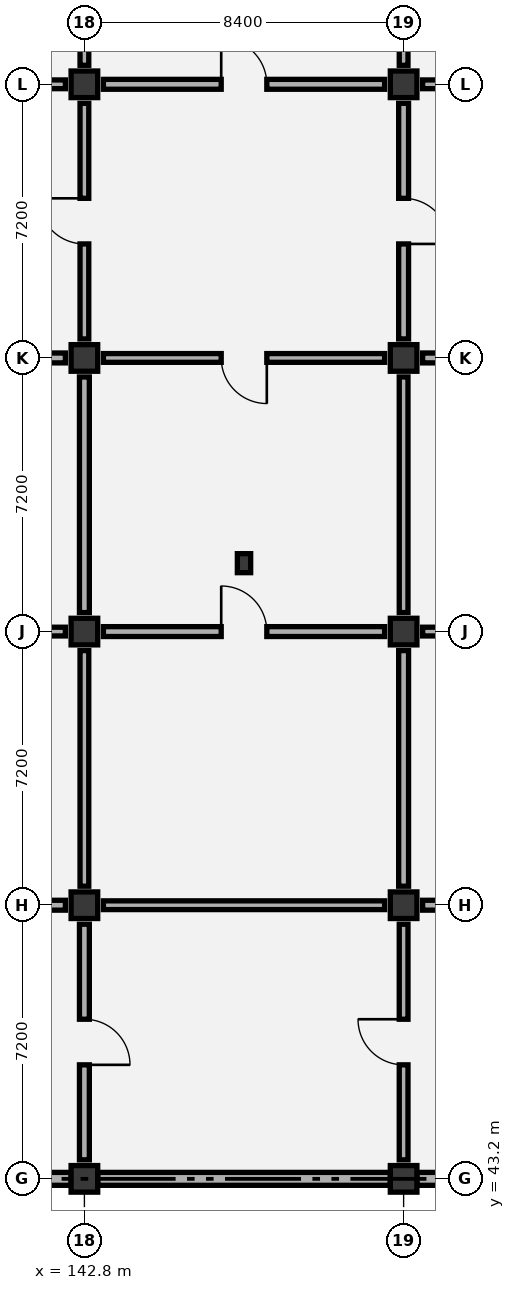
"""IFC4 building model, lengths in metres.
Left out: names, types, materials, properties, quantities, classifications, styles, units other than length and angle.
Written with IfcOpenShell. Run it as: python <this file> out.ifc"""

import sys

from ifc_helpers import new_model, si_unit, direction, frame, frame_2d, origin, origin_2d, place, context, subcontext, project, spatial, rectangle, extrude, element, fill, save


model = new_model("IFC4")
c1 = context("Model", 3, precision=1e-05, world=origin(), true_north=direction((0.0, 1.0)))
c2 = subcontext(c1, "Body", "Model", "MODEL_VIEW")
j1 = project(units=[si_unit("LENGTHUNIT", "METRE"), si_unit("PLANEANGLEUNIT", "RADIAN")], contexts=[c1])
p1 = place(None, origin())
s1 = spatial("IfcSite", under=j1, at=p1, CompositionType="ELEMENT")
p2 = place(p1, origin())
s2 = spatial("IfcBuilding", under=s1, at=p2, CompositionType="ELEMENT")
p3 = place(p2, origin())
s3 = spatial("IfcBuildingStorey", under=s2, at=p3, CompositionType="ELEMENT", Elevation=0.0)
for number, where, z_axis, x_axis in (
    (1, (142.8, 43.2, 0.0), (0.0, 0.0, 1.0), (1.0, 0.0, 0.0)),
    (2, (142.8, 50.4, 0.0), (0.0, 0.0, 1.0), (1.0, 0.0, 0.0)),
    (3, (142.8, 57.6, 0.0), (0.0, 0.0, 1.0), (1.0, 0.0, 0.0)),
    (4, (142.8, 64.8, 0.0), (0.0, 0.0, 1.0), (1.0, 0.0, 0.0)),
    (5, (142.8, 72.0, 0.0), (0.0, 0.0, 1.0), (1.0, 0.0, 0.0)),
    (6, (151.2, 43.2, 0.0), (0.0, 0.0, 1.0), (1.0, 0.0, 0.0)),
    (7, (151.2, 50.4, 0.0), (0.0, 0.0, 1.0), (1.0, 0.0, 0.0)),
    (8, (151.2, 57.6, 0.0), (0.0, 0.0, 1.0), (1.0, 0.0, 0.0)),
    (9, (151.2, 64.8, 0.0), (0.0, 0.0, 1.0), (1.0, 0.0, 0.0)),
    (10, (151.2, 72.0, 0.0), (0.0, 0.0, 1.0), (1.0, 0.0, 0.0)),
):
    element("IfcColumn", number, at=place(p3, frame(where, z_axis=z_axis, x_axis=x_axis)), inside=s3, PredefinedType="COLUMN", context=c2, shape_type="SweptSolid", body=[
        extrude(rectangle(XDim=0.7, YDim=0.7, at=origin_2d()), origin(), (0.0, 0.0, 1.0), 6.0),
    ])
p4 = place(p3, frame((147.0, 59.4, 0.0), z_axis=(0.0, 0.0, 1.0), x_axis=(1.0, 0.0, 0.0)))
e11 = element("IfcColumn", 11, at=p4, inside=s3, PredefinedType="PILASTER", context=c2, shape_type="SweptSolid", body=[
    extrude(rectangle(XDim=0.35, YDim=0.5, at=origin_2d()), origin(), (0.0, 0.0, 1.0), 6.0),
])
p5 = place(p3, frame((134.75, 43.2, 0.0), z_axis=(0.0, 0.0, 1.0), x_axis=(1.0, 0.0, 0.0)))
e12 = element("IfcWall", 12, at=p5, inside=s3, PredefinedType="SOLIDWALL", context=c2, shape_type="SweptSolid", body=[
    extrude(rectangle(XDim=7.7, YDim=0.34, at=frame_2d((3.85, 0.0))), origin(), (0.0, 0.0, 1.0), 5.02),
])
p6 = place(p3, frame((143.15, 43.2, 0.0), z_axis=(0.0, 0.0, 1.0), x_axis=(1.0, 0.0, 0.0)))
e13 = element("IfcWall", 13, at=p6, inside=s3, PredefinedType="SOLIDWALL", context=c2, shape_type="SweptSolid", body=[
    extrude(rectangle(XDim=7.7, YDim=0.34, at=frame_2d((3.85, 0.0))), origin(), (0.0, 0.0, 1.0), 5.02),
])
p7 = place(p3, frame((151.55, 43.2, 0.0), z_axis=(0.0, 0.0, 1.0), x_axis=(1.0, 0.0, 0.0)))
e14 = element("IfcWall", 14, at=p7, inside=s3, PredefinedType="SOLIDWALL", context=c2, shape_type="SweptSolid", body=[
    extrude(rectangle(XDim=7.7, YDim=0.34, at=frame_2d((3.85, 0.0))), origin(), (0.0, 0.0, 1.0), 5.02),
])
p8 = place(p3, frame((142.8, 43.7, 0.0), z_axis=(0.0, 0.0, 1.0), x_axis=(0.0, 1.0, 0.0)))
e15 = element("IfcWall", 15, at=p8, inside=s3, PredefinedType="PARTITIONING", context=c2, shape_type="SweptSolid", body=[
    extrude(rectangle(XDim=6.2, YDim=0.26, at=frame_2d((3.1, 0.0))), origin(), (0.0, 0.0, 1.0), 4.92),
])
p9 = place(p8, frame((2.5, 0.0, 0.0)))
e16 = element("IfcOpeningElement", 16, at=p9, cuts=e15, PredefinedType="OPENING", context=c2, shape_type="SweptSolid", body=[
    extrude(rectangle(XDim=1.2, YDim=2.1, at=frame_2d((0.6, 1.05))), frame((0.0, 0.14, 0.0), z_axis=(0.0, -1.0, 0.0), x_axis=(1.0, 0.0, 0.0)), (0.0, 0.0, 1.0), 0.28),
])
p10 = place(p3, frame((134.9, 50.4, 0.0), z_axis=(0.0, 0.0, 1.0), x_axis=(1.0, 0.0, 0.0)))
e17 = element("IfcWall", 17, at=p10, inside=s3, PredefinedType="PARTITIONING", context=c2, shape_type="SweptSolid", body=[
    extrude(rectangle(XDim=7.4, YDim=0.26, at=frame_2d((3.7, 0.0))), origin(), (0.0, 0.0, 1.0), 4.87),
])
p11 = place(p3, frame((142.8, 50.9, 0.0), z_axis=(0.0, 0.0, 1.0), x_axis=(0.0, 1.0, 0.0)))
e18 = element("IfcWall", 18, at=p11, inside=s3, PredefinedType="PARTITIONING", context=c2, shape_type="SweptSolid", body=[
    extrude(rectangle(XDim=6.2, YDim=0.23, at=frame_2d((3.1, 0.0))), origin(), (0.0, 0.0, 1.0), 5.27),
])
p12 = place(p3, frame((134.9, 57.6, 0.0), z_axis=(0.0, 0.0, 1.0), x_axis=(1.0, 0.0, 0.0)))
e19 = element("IfcWall", 19, at=p12, inside=s3, PredefinedType="PARTITIONING", context=c2, shape_type="SweptSolid", body=[
    extrude(rectangle(XDim=7.4, YDim=0.23, at=frame_2d((3.7, 0.0))), origin(), (0.0, 0.0, 1.0), 4.87),
])
p13 = place(p12, frame((3.1, 0.0, 0.0)))
e20 = element("IfcOpeningElement", 20, at=p13, cuts=e19, PredefinedType="OPENING", context=c2, shape_type="SweptSolid", body=[
    extrude(rectangle(XDim=1.2, YDim=2.1, at=frame_2d((0.6, 1.05))), frame((0.0, 0.125, 0.0), z_axis=(0.0, -1.0, 0.0), x_axis=(1.0, 0.0, 0.0)), (0.0, 0.0, 1.0), 0.25),
])
p14 = place(p3, frame((142.8, 58.1, 0.0), z_axis=(0.0, 0.0, 1.0), x_axis=(0.0, 1.0, 0.0)))
e21 = element("IfcWall", 21, at=p14, inside=s3, PredefinedType="PARTITIONING", context=c2, shape_type="SweptSolid", body=[
    extrude(rectangle(XDim=6.2, YDim=0.26, at=frame_2d((3.1, 0.0))), origin(), (0.0, 0.0, 1.0), 4.92),
])
p15 = place(p3, frame((134.9, 64.8, 0.0), z_axis=(0.0, 0.0, 1.0), x_axis=(1.0, 0.0, 0.0)))
e22 = element("IfcWall", 22, at=p15, inside=s3, PredefinedType="PARTITIONING", context=c2, shape_type="SweptSolid", body=[
    extrude(rectangle(XDim=7.4, YDim=0.26, at=frame_2d((3.7, 0.0))), origin(), (0.0, 0.0, 1.0), 4.87),
])
p16 = place(p15, frame((3.1, 0.0, 0.0)))
e23 = element("IfcOpeningElement", 23, at=p16, cuts=e22, PredefinedType="OPENING", context=c2, shape_type="SweptSolid", body=[
    extrude(rectangle(XDim=1.2, YDim=2.1, at=frame_2d((0.6, 1.05))), frame((0.0, 0.14, 0.0), z_axis=(0.0, -1.0, 0.0), x_axis=(1.0, 0.0, 0.0)), (0.0, 0.0, 1.0), 0.28),
])
p17 = place(p3, frame((142.8, 65.3, 0.0), z_axis=(0.0, 0.0, 1.0), x_axis=(0.0, 1.0, 0.0)))
e24 = element("IfcWall", 24, at=p17, inside=s3, PredefinedType="PARTITIONING", context=c2, shape_type="SweptSolid", body=[
    extrude(rectangle(XDim=6.2, YDim=0.23, at=frame_2d((3.1, 0.0))), origin(), (0.0, 0.0, 1.0), 5.38),
])
p18 = place(p17, frame((2.5, 0.0, 0.0)))
e25 = element("IfcOpeningElement", 25, at=p18, cuts=e24, PredefinedType="OPENING", context=c2, shape_type="SweptSolid", body=[
    extrude(rectangle(XDim=1.2, YDim=2.1, at=frame_2d((0.6, 1.05))), frame((0.0, 0.125, 0.0), z_axis=(0.0, -1.0, 0.0), x_axis=(1.0, 0.0, 0.0)), (0.0, 0.0, 1.0), 0.25),
])
p19 = place(p3, frame((134.9, 72.0, 0.0), z_axis=(0.0, 0.0, 1.0), x_axis=(1.0, 0.0, 0.0)))
e26 = element("IfcWall", 26, at=p19, inside=s3, PredefinedType="PARTITIONING", context=c2, shape_type="SweptSolid", body=[
    extrude(rectangle(XDim=7.4, YDim=0.23, at=frame_2d((3.7, 0.0))), origin(), (0.0, 0.0, 1.0), 4.87),
])
p20 = place(p19, frame((2.95, 0.0, 0.0)))
e27 = element("IfcOpeningElement", 27, at=p20, cuts=e26, PredefinedType="OPENING", context=c2, shape_type="SweptSolid", body=[
    extrude(rectangle(XDim=1.5, YDim=2.15, at=frame_2d((0.75, 1.075))), frame((0.0, 0.125, 0.0), z_axis=(0.0, -1.0, 0.0), x_axis=(1.0, 0.0, 0.0)), (0.0, 0.0, 1.0), 0.25),
])
p21 = place(p3, frame((142.8, 72.5, 0.0), z_axis=(0.0, 0.0, 1.0), x_axis=(0.0, 1.0, 0.0)))
e28 = element("IfcWall", 28, at=p21, inside=s3, PredefinedType="PARTITIONING", context=c2, shape_type="SweptSolid", body=[
    extrude(rectangle(XDim=6.2, YDim=0.23, at=frame_2d((3.1, 0.0))), origin(), (0.0, 0.0, 1.0), 4.92),
])
p22 = place(p3, frame((151.2, 43.7, 0.0), z_axis=(0.0, 0.0, 1.0), x_axis=(0.0, 1.0, 0.0)))
e29 = element("IfcWall", 29, at=p22, inside=s3, PredefinedType="PARTITIONING", context=c2, shape_type="SweptSolid", body=[
    extrude(rectangle(XDim=6.2, YDim=0.23, at=frame_2d((3.1, 0.0))), origin(), (0.0, 0.0, 1.0), 5.27),
])
p23 = place(p22, frame((2.5, 0.0, 0.0)))
e30 = element("IfcOpeningElement", 30, at=p23, cuts=e29, PredefinedType="OPENING", context=c2, shape_type="SweptSolid", body=[
    extrude(rectangle(XDim=1.2, YDim=2.1, at=frame_2d((0.6, 1.05))), frame((0.0, 0.125, 0.0), z_axis=(0.0, -1.0, 0.0), x_axis=(1.0, 0.0, 0.0)), (0.0, 0.0, 1.0), 0.25),
])
p24 = place(p3, frame((143.3, 50.4, 0.0), z_axis=(0.0, 0.0, 1.0), x_axis=(1.0, 0.0, 0.0)))
e31 = element("IfcWall", 31, at=p24, inside=s3, PredefinedType="PARTITIONING", context=c2, shape_type="SweptSolid", body=[
    extrude(rectangle(XDim=7.4, YDim=0.23, at=frame_2d((3.7, 0.0))), origin(), (0.0, 0.0, 1.0), 4.87),
])
p25 = place(p3, frame((151.2, 50.9, 0.0), z_axis=(0.0, 0.0, 1.0), x_axis=(0.0, 1.0, 0.0)))
e32 = element("IfcWall", 32, at=p25, inside=s3, PredefinedType="PARTITIONING", context=c2, shape_type="SweptSolid", body=[
    extrude(rectangle(XDim=6.2, YDim=0.26, at=frame_2d((3.1, 0.0))), origin(), (0.0, 0.0, 1.0), 4.92),
])
p26 = place(p3, frame((143.3, 57.6, 0.0), z_axis=(0.0, 0.0, 1.0), x_axis=(1.0, 0.0, 0.0)))
e33 = element("IfcWall", 33, at=p26, inside=s3, PredefinedType="PARTITIONING", context=c2, shape_type="SweptSolid", body=[
    extrude(rectangle(XDim=7.4, YDim=0.26, at=frame_2d((3.7, 0.0))), origin(), (0.0, 0.0, 1.0), 4.87),
])
p27 = place(p26, frame((3.1, 0.0, 0.0)))
e34 = element("IfcOpeningElement", 34, at=p27, cuts=e33, PredefinedType="OPENING", context=c2, shape_type="SweptSolid", body=[
    extrude(rectangle(XDim=1.2, YDim=2.1, at=frame_2d((0.6, 1.05))), frame((0.0, 0.14, 0.0), z_axis=(0.0, -1.0, 0.0), x_axis=(1.0, 0.0, 0.0)), (0.0, 0.0, 1.0), 0.28),
])
p28 = place(p3, frame((151.2, 58.1, 0.0), z_axis=(0.0, 0.0, 1.0), x_axis=(0.0, 1.0, 0.0)))
e35 = element("IfcWall", 35, at=p28, inside=s3, PredefinedType="PARTITIONING", context=c2, shape_type="SweptSolid", body=[
    extrude(rectangle(XDim=6.2, YDim=0.23, at=frame_2d((3.1, 0.0))), origin(), (0.0, 0.0, 1.0), 5.38),
])
p29 = place(p3, frame((143.3, 64.8, 0.0), z_axis=(0.0, 0.0, 1.0), x_axis=(1.0, 0.0, 0.0)))
e36 = element("IfcWall", 36, at=p29, inside=s3, PredefinedType="PARTITIONING", context=c2, shape_type="SweptSolid", body=[
    extrude(rectangle(XDim=7.4, YDim=0.23, at=frame_2d((3.7, 0.0))), origin(), (0.0, 0.0, 1.0), 4.87),
])
p30 = place(p29, frame((3.1, 0.0, 0.0)))
e37 = element("IfcOpeningElement", 37, at=p30, cuts=e36, PredefinedType="OPENING", context=c2, shape_type="SweptSolid", body=[
    extrude(rectangle(XDim=1.2, YDim=2.1, at=frame_2d((0.6, 1.05))), frame((0.0, 0.125, 0.0), z_axis=(0.0, -1.0, 0.0), x_axis=(1.0, 0.0, 0.0)), (0.0, 0.0, 1.0), 0.25),
])
p31 = place(p3, frame((151.2, 65.3, 0.0), z_axis=(0.0, 0.0, 1.0), x_axis=(0.0, 1.0, 0.0)))
e38 = element("IfcWall", 38, at=p31, inside=s3, PredefinedType="PARTITIONING", context=c2, shape_type="SweptSolid", body=[
    extrude(rectangle(XDim=6.2, YDim=0.26, at=frame_2d((3.1, 0.0))), origin(), (0.0, 0.0, 1.0), 4.92),
])
p32 = place(p31, frame((2.5, 0.0, 0.0)))
e39 = element("IfcOpeningElement", 39, at=p32, cuts=e38, PredefinedType="OPENING", context=c2, shape_type="SweptSolid", body=[
    extrude(rectangle(XDim=1.2, YDim=2.1, at=frame_2d((0.6, 1.05))), frame((0.0, 0.14, 0.0), z_axis=(0.0, -1.0, 0.0), x_axis=(1.0, 0.0, 0.0)), (0.0, 0.0, 1.0), 0.28),
])
p33 = place(p3, frame((143.3, 72.0, 0.0), z_axis=(0.0, 0.0, 1.0), x_axis=(1.0, 0.0, 0.0)))
e40 = element("IfcWall", 40, at=p33, inside=s3, PredefinedType="PARTITIONING", context=c2, shape_type="SweptSolid", body=[
    extrude(rectangle(XDim=7.4, YDim=0.26, at=frame_2d((3.7, 0.0))), origin(), (0.0, 0.0, 1.0), 4.87),
])
p34 = place(p33, frame((3.1, 0.0, 0.0)))
e41 = element("IfcOpeningElement", 41, at=p34, cuts=e40, PredefinedType="OPENING", context=c2, shape_type="SweptSolid", body=[
    extrude(rectangle(XDim=1.2, YDim=2.1, at=frame_2d((0.6, 1.05))), frame((0.0, 0.14, 0.0), z_axis=(0.0, -1.0, 0.0), x_axis=(1.0, 0.0, 0.0)), (0.0, 0.0, 1.0), 0.28),
])
p35 = place(p3, frame((151.2, 72.5, 0.0), z_axis=(0.0, 0.0, 1.0), x_axis=(0.0, 1.0, 0.0)))
e42 = element("IfcWall", 42, at=p35, inside=s3, PredefinedType="PARTITIONING", context=c2, shape_type="SweptSolid", body=[
    extrude(rectangle(XDim=6.2, YDim=0.23, at=frame_2d((3.1, 0.0))), origin(), (0.0, 0.0, 1.0), 5.17),
])
p36 = place(p3, frame((151.7, 50.4, 0.0), z_axis=(0.0, 0.0, 1.0), x_axis=(1.0, 0.0, 0.0)))
e43 = element("IfcWall", 43, at=p36, inside=s3, PredefinedType="PARTITIONING", context=c2, shape_type="SweptSolid", body=[
    extrude(rectangle(XDim=7.4, YDim=0.26, at=frame_2d((3.7, 0.0))), origin(), (0.0, 0.0, 1.0), 4.87),
])
p37 = place(p3, frame((151.7, 57.6, 0.0), z_axis=(0.0, 0.0, 1.0), x_axis=(1.0, 0.0, 0.0)))
e44 = element("IfcWall", 44, at=p37, inside=s3, PredefinedType="PARTITIONING", context=c2, shape_type="SweptSolid", body=[
    extrude(rectangle(XDim=7.4, YDim=0.23, at=frame_2d((3.7, 0.0))), origin(), (0.0, 0.0, 1.0), 4.87),
])
p38 = place(p37, frame((3.1, 0.0, 0.0)))
e45 = element("IfcOpeningElement", 45, at=p38, cuts=e44, PredefinedType="OPENING", context=c2, shape_type="SweptSolid", body=[
    extrude(rectangle(XDim=1.2, YDim=2.1, at=frame_2d((0.6, 1.05))), frame((0.0, 0.125, 0.0), z_axis=(0.0, -1.0, 0.0), x_axis=(1.0, 0.0, 0.0)), (0.0, 0.0, 1.0), 0.25),
])
p39 = place(p3, frame((151.7, 64.8, 0.0), z_axis=(0.0, 0.0, 1.0), x_axis=(1.0, 0.0, 0.0)))
e46 = element("IfcWall", 46, at=p39, inside=s3, PredefinedType="PARTITIONING", context=c2, shape_type="SweptSolid", body=[
    extrude(rectangle(XDim=7.4, YDim=0.26, at=frame_2d((3.7, 0.0))), origin(), (0.0, 0.0, 1.0), 4.87),
])
p40 = place(p39, frame((3.1, 0.0, 0.0)))
e47 = element("IfcOpeningElement", 47, at=p40, cuts=e46, PredefinedType="OPENING", context=c2, shape_type="SweptSolid", body=[
    extrude(rectangle(XDim=1.2, YDim=2.1, at=frame_2d((0.6, 1.05))), frame((0.0, 0.14, 0.0), z_axis=(0.0, -1.0, 0.0), x_axis=(1.0, 0.0, 0.0)), (0.0, 0.0, 1.0), 0.28),
])
p41 = place(p3, frame((151.7, 72.0, 0.0), z_axis=(0.0, 0.0, 1.0), x_axis=(1.0, 0.0, 0.0)))
e48 = element("IfcWall", 48, at=p41, inside=s3, PredefinedType="PARTITIONING", context=c2, shape_type="SweptSolid", body=[
    extrude(rectangle(XDim=7.4, YDim=0.23, at=frame_2d((3.7, 0.0))), origin(), (0.0, 0.0, 1.0), 4.87),
])
p42 = place(p41, frame((3.1, 0.0, 0.0)))
e49 = element("IfcOpeningElement", 49, at=p42, cuts=e48, PredefinedType="OPENING", context=c2, shape_type="SweptSolid", body=[
    extrude(rectangle(XDim=1.2, YDim=2.1, at=frame_2d((0.6, 1.05))), frame((0.0, 0.125, 0.0), z_axis=(0.0, -1.0, 0.0), x_axis=(1.0, 0.0, 0.0)), (0.0, 0.0, 1.0), 0.25),
])
p43 = place(p9, frame((1.2, 0.0, 0.0), z_axis=(0.0, 0.0, 1.0), x_axis=(-1.0, 0.0, 0.0)))
e50 = element("IfcDoor", 50, at=p43, inside=s3, OperationType="SINGLE_SWING_RIGHT", PredefinedType="DOOR", context=c2, shape_type="SweptSolid", body=[
    extrude(rectangle(XDim=1.2, YDim=2.1, at=frame_2d((0.6, 1.05))), frame((0.0, 0.025, 0.0), z_axis=(0.0, -1.0, 0.0), x_axis=(1.0, 0.0, 0.0)), (0.0, 0.0, 1.0), 0.05),
])
fill(e16, e50)
p44 = place(p18, origin())
e51 = element("IfcDoor", 51, at=p44, inside=s3, OperationType="SINGLE_SWING_RIGHT", PredefinedType="DOOR", context=c2, shape_type="SweptSolid", body=[
    extrude(rectangle(XDim=1.2, YDim=2.1, at=frame_2d((0.6, 1.05))), frame((0.0, 0.025, 0.0), z_axis=(0.0, -1.0, 0.0), x_axis=(1.0, 0.0, 0.0)), (0.0, 0.0, 1.0), 0.05),
])
fill(e25, e51)
p45 = place(p23, origin())
e52 = element("IfcDoor", 52, at=p45, inside=s3, OperationType="SINGLE_SWING_RIGHT", PredefinedType="DOOR", context=c2, shape_type="SweptSolid", body=[
    extrude(rectangle(XDim=1.2, YDim=2.1, at=frame_2d((0.6, 1.05))), frame((0.0, 0.025, 0.0), z_axis=(0.0, -1.0, 0.0), x_axis=(1.0, 0.0, 0.0)), (0.0, 0.0, 1.0), 0.05),
])
fill(e30, e52)
p46 = place(p27, origin())
e53 = element("IfcDoor", 53, at=p46, inside=s3, OperationType="SINGLE_SWING_LEFT", PredefinedType="DOOR", context=c2, shape_type="SweptSolid", body=[
    extrude(rectangle(XDim=1.2, YDim=2.1, at=frame_2d((0.6, 1.05))), frame((0.0, 0.025, 0.0), z_axis=(0.0, -1.0, 0.0), x_axis=(1.0, 0.0, 0.0)), (0.0, 0.0, 1.0), 0.05),
])
fill(e34, e53)
p47 = place(p30, frame((1.2, 0.0, 0.0), z_axis=(0.0, 0.0, 1.0), x_axis=(-1.0, 0.0, 0.0)))
e54 = element("IfcDoor", 54, at=p47, inside=s3, OperationType="SINGLE_SWING_LEFT", PredefinedType="DOOR", context=c2, shape_type="SweptSolid", body=[
    extrude(rectangle(XDim=1.2, YDim=2.1, at=frame_2d((0.6, 1.05))), frame((0.0, 0.025, 0.0), z_axis=(0.0, -1.0, 0.0), x_axis=(1.0, 0.0, 0.0)), (0.0, 0.0, 1.0), 0.05),
])
fill(e37, e54)
p48 = place(p32, frame((1.2, 0.0, 0.0), z_axis=(0.0, 0.0, 1.0), x_axis=(-1.0, 0.0, 0.0)))
e55 = element("IfcDoor", 55, at=p48, inside=s3, OperationType="SINGLE_SWING_RIGHT", PredefinedType="DOOR", context=c2, shape_type="SweptSolid", body=[
    extrude(rectangle(XDim=1.2, YDim=2.1, at=frame_2d((0.6, 1.05))), frame((0.0, 0.025, 0.0), z_axis=(0.0, -1.0, 0.0), x_axis=(1.0, 0.0, 0.0)), (0.0, 0.0, 1.0), 0.05),
])
fill(e39, e55)
p49 = place(p34, origin())
e56 = element("IfcDoor", 56, at=p49, inside=s3, OperationType="SINGLE_SWING_LEFT", PredefinedType="DOOR", context=c2, shape_type="SweptSolid", body=[
    extrude(rectangle(XDim=1.2, YDim=2.1, at=frame_2d((0.6, 1.05))), frame((0.0, 0.025, 0.0), z_axis=(0.0, -1.0, 0.0), x_axis=(1.0, 0.0, 0.0)), (0.0, 0.0, 1.0), 0.05),
])
fill(e41, e56)
save(model, sys.argv[1])
